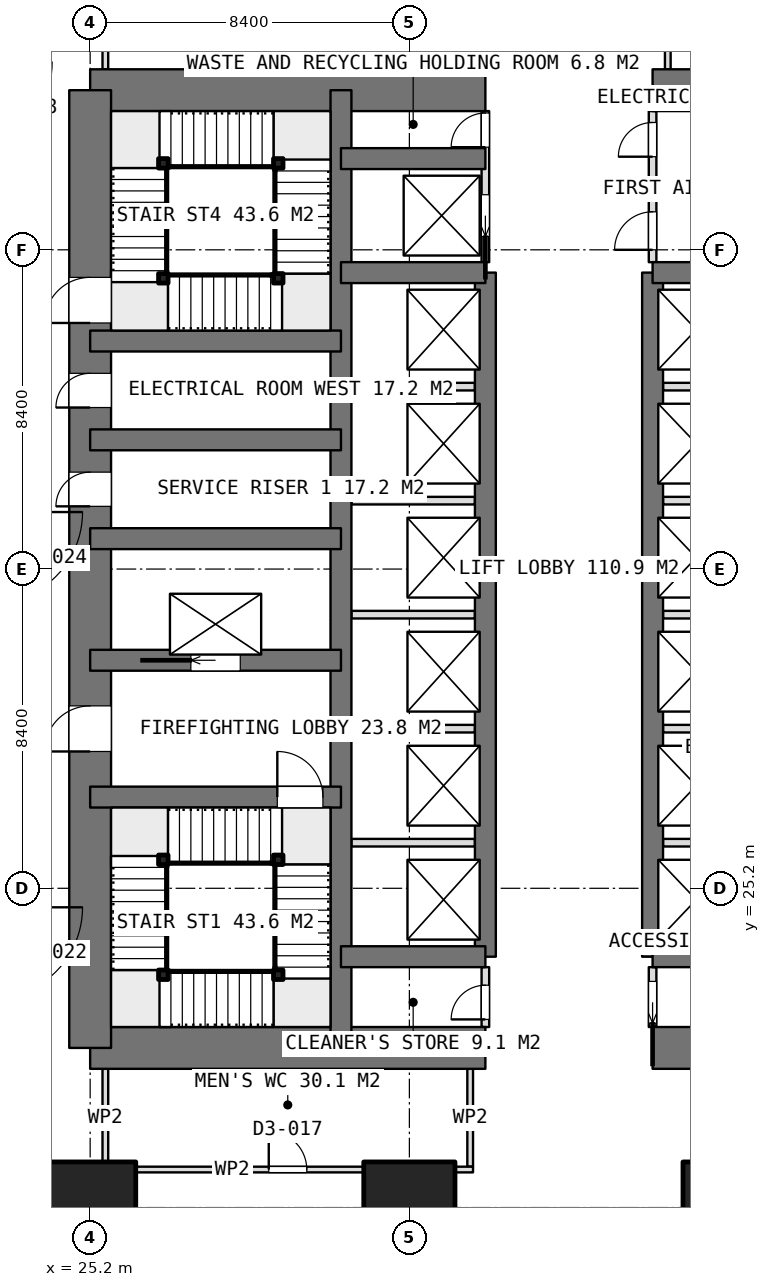
"""IFC4 building model, lengths in metres.
Left out: names, types, materials, properties, quantities, classifications, styles, units other than length and angle.
Written with IfcOpenShell. Run it as: python <this file> out.ifc"""

import sys

from ifc_helpers import new_model, si_unit, direction, frame, frame_2d, origin, origin_2d, place, context, subcontext, project, spatial, rectangle, extrude, element, fill, save


model = new_model("IFC4")
c1 = context("Model", 3, precision=1e-05, world=origin(), true_north=direction((0.0, 1.0)))
c2 = subcontext(c1, "Body", "Model", "MODEL_VIEW")
j1 = project(units=[si_unit("LENGTHUNIT", "METRE"), si_unit("PLANEANGLEUNIT", "RADIAN")], contexts=[c1])
p1 = place(None, origin())
s1 = spatial("IfcSite", under=j1, at=p1, CompositionType="ELEMENT")
p2 = place(p1, origin())
s2 = spatial("IfcBuilding", under=s1, at=p2, CompositionType="ELEMENT")
p3 = place(p2, frame((0.0, 0.0, 10.4)))
s3 = spatial("IfcBuildingStorey", under=s2, at=p3, CompositionType="ELEMENT", Elevation=10.4)
p4 = place(p3, frame((25.2, 21.0, 0.0), z_axis=(0.0, 0.0, 1.0), x_axis=(1.0, 0.0, 0.0)))
e1 = element("IfcWall", 1, at=p4, inside=s3, PredefinedType="SHEAR", context=c2, shape_type="SweptSolid", body=[
    extrude(rectangle(XDim=10.4, YDim=1.1, at=frame_2d((5.2, 0.0))), origin(), (0.0, 0.0, 1.0), 5.0),
])
p5 = place(p3, frame((40.0, 21.0, 0.0), z_axis=(0.0, 0.0, 1.0), x_axis=(1.0, 0.0, 0.0)))
e2 = element("IfcWall", 2, at=p5, inside=s3, PredefinedType="SHEAR", context=c2, shape_type="SweptSolid", body=[
    extrude(rectangle(XDim=10.4, YDim=1.1, at=frame_2d((5.2, 0.0))), origin(), (0.0, 0.0, 1.0), 5.0),
])
p6 = place(p3, frame((25.2, 46.2, 0.0), z_axis=(0.0, 0.0, 1.0), x_axis=(1.0, 0.0, 0.0)))
e3 = element("IfcWall", 3, at=p6, inside=s3, PredefinedType="SHEAR", context=c2, shape_type="SweptSolid", body=[
    extrude(rectangle(XDim=10.4, YDim=1.1, at=frame_2d((5.2, 0.0))), origin(), (0.0, 0.0, 1.0), 5.0),
])
p7 = place(p3, frame((40.0, 46.2, 0.0), z_axis=(0.0, 0.0, 1.0), x_axis=(1.0, 0.0, 0.0)))
e4 = element("IfcWall", 4, at=p7, inside=s3, PredefinedType="SHEAR", context=c2, shape_type="SweptSolid", body=[
    extrude(rectangle(XDim=10.4, YDim=1.1, at=frame_2d((5.2, 0.0))), origin(), (0.0, 0.0, 1.0), 5.0),
])
p8 = place(p3, frame((25.2, 21.0, 0.0), z_axis=(0.0, 0.0, 1.0), x_axis=(0.0, 1.0, 0.0)))
e5 = element("IfcWall", 5, at=p8, inside=s3, PredefinedType="SHEAR", context=c2, shape_type="SweptSolid", body=[
    extrude(rectangle(XDim=25.2, YDim=1.1, at=frame_2d((12.6, 0.0))), origin(), (0.0, 0.0, 1.0), 5.0),
])
p9 = place(p8, frame((7.8, 0.0, 0.0)))
e6 = element("IfcOpeningElement", 6, at=p9, cuts=e5, PredefinedType="OPENING", context=c2, shape_type="SweptSolid", body=[
    extrude(rectangle(XDim=1.2, YDim=2.1, at=frame_2d((0.6, 1.05))), frame((0.0, 0.56, 0.0), z_axis=(0.0, -1.0, 0.0), x_axis=(1.0, 0.0, 0.0)), (0.0, 0.0, 1.0), 1.12),
])
p10 = place(p8, frame((14.25, 0.0, 0.0)))
e7 = element("IfcOpeningElement", 7, at=p10, cuts=e5, PredefinedType="OPENING", context=c2, shape_type="SweptSolid", body=[
    extrude(rectangle(XDim=0.9, YDim=2.1, at=frame_2d((0.45, 1.05))), frame((0.0, 0.56, 0.0), z_axis=(0.0, -1.0, 0.0), x_axis=(1.0, 0.0, 0.0)), (0.0, 0.0, 1.0), 1.12),
])
p11 = place(p8, frame((16.85, 0.0, 0.0)))
e8 = element("IfcOpeningElement", 8, at=p11, cuts=e5, PredefinedType="OPENING", context=c2, shape_type="SweptSolid", body=[
    extrude(rectangle(XDim=0.9, YDim=2.1, at=frame_2d((0.45, 1.05))), frame((0.0, 0.56, 0.0), z_axis=(0.0, -1.0, 0.0), x_axis=(1.0, 0.0, 0.0)), (0.0, 0.0, 1.0), 1.12),
])
p12 = place(p8, frame((19.075, 0.0, 0.0)))
e9 = element("IfcOpeningElement", 9, at=p12, cuts=e5, PredefinedType="OPENING", context=c2, shape_type="SweptSolid", body=[
    extrude(rectangle(XDim=1.2, YDim=2.1, at=frame_2d((0.6, 1.05))), frame((0.0, 0.56, 0.0), z_axis=(0.0, -1.0, 0.0), x_axis=(1.0, 0.0, 0.0)), (0.0, 0.0, 1.0), 1.12),
])
p13 = place(p3, frame((31.8, 21.0, 0.0), z_axis=(0.0, 0.0, 1.0), x_axis=(0.0, 1.0, 0.0)))
e10 = element("IfcWall", 10, at=p13, inside=s3, PredefinedType="SHEAR", context=c2, shape_type="SweptSolid", body=[
    extrude(rectangle(XDim=25.2, YDim=0.55, at=frame_2d((12.6, 0.0))), origin(), (0.0, 0.0, 1.0), 5.0),
])
for number, where, z_axis, x_axis in (
    (11, (35.6, 23.4, 0.0), (0.0, 0.0, 1.0), (0.0, 1.0, 0.0)),
    (12, (40.0, 23.4, 0.0), (0.0, 0.0, 1.0), (0.0, 1.0, 0.0)),
):
    element("IfcWall", number, at=place(p3, frame(where, z_axis=z_axis, x_axis=x_axis)), inside=s3, PredefinedType="SHEAR", context=c2, shape_type="SweptSolid", body=[
        extrude(rectangle(XDim=18.0, YDim=0.55, at=frame_2d((9.0, 0.0))), origin(), (0.0, 0.0, 1.0), 5.0),
    ])
for number, where, z_axis, x_axis in (
    (13, (31.8, 23.4, 0.0), (0.0, 0.0, 1.0), (1.0, 0.0, 0.0)),
    (14, (31.8, 41.4, 0.0), (0.0, 0.0, 1.0), (1.0, 0.0, 0.0)),
    (15, (31.8, 44.4, 0.0), (0.0, 0.0, 1.0), (1.0, 0.0, 0.0)),
    (16, (40.0, 23.4, 0.0), (0.0, 0.0, 1.0), (1.0, 0.0, 0.0)),
    (17, (40.0, 41.4, 0.0), (0.0, 0.0, 1.0), (1.0, 0.0, 0.0)),
):
    element("IfcWall", number, at=place(p3, frame(where, z_axis=z_axis, x_axis=x_axis)), inside=s3, PredefinedType="SHEAR", context=c2, shape_type="SweptSolid", body=[
        extrude(rectangle(XDim=3.8, YDim=0.55, at=frame_2d((1.9, 0.0))), origin(), (0.0, 0.0, 1.0), 5.0),
    ])
p14 = place(p3, frame((25.2, 27.6, 0.0), z_axis=(0.0, 0.0, 1.0), x_axis=(1.0, 0.0, 0.0)))
e18 = element("IfcWall", 18, at=p14, inside=s3, PredefinedType="SHEAR", context=c2, shape_type="SweptSolid", body=[
    extrude(rectangle(XDim=6.6, YDim=0.55, at=frame_2d((3.3, 0.0))), origin(), (0.0, 0.0, 1.0), 5.0),
])
p15 = place(p14, frame((4.925, 0.0, 0.0)))
e19 = element("IfcOpeningElement", 19, at=p15, cuts=e18, PredefinedType="OPENING", context=c2, shape_type="SweptSolid", body=[
    extrude(rectangle(XDim=1.2, YDim=2.1, at=frame_2d((0.6, 1.05))), frame((0.0, 0.285, 0.0), z_axis=(0.0, -1.0, 0.0), x_axis=(1.0, 0.0, 0.0)), (0.0, 0.0, 1.0), 0.57),
])
p16 = place(p3, frame((25.2, 31.2, 0.0), z_axis=(0.0, 0.0, 1.0), x_axis=(1.0, 0.0, 0.0)))
e20 = element("IfcWall", 20, at=p16, inside=s3, PredefinedType="SHEAR", context=c2, shape_type="SweptSolid", body=[
    extrude(rectangle(XDim=6.6, YDim=0.55, at=frame_2d((3.3, 0.0))), origin(), (0.0, 0.0, 1.0), 5.0),
])
p17 = place(p16, frame((2.65, 0.0, 0.0)))
e21 = element("IfcOpeningElement", 21, at=p17, cuts=e20, PredefinedType="OPENING", context=c2, shape_type="SweptSolid", body=[
    extrude(rectangle(XDim=1.3, YDim=2.1, at=frame_2d((0.65, 1.05))), frame((0.0, 0.285, 0.0), z_axis=(0.0, -1.0, 0.0), x_axis=(1.0, 0.0, 0.0)), (0.0, 0.0, 1.0), 0.57),
])
for number, where, z_axis, x_axis in (
    (22, (25.2, 34.4, 0.0), (0.0, 0.0, 1.0), (1.0, 0.0, 0.0)),
    (23, (25.2, 37.0, 0.0), (0.0, 0.0, 1.0), (1.0, 0.0, 0.0)),
    (24, (25.2, 39.6, 0.0), (0.0, 0.0, 1.0), (1.0, 0.0, 0.0)),
):
    element("IfcWall", number, at=place(p3, frame(where, z_axis=z_axis, x_axis=x_axis)), inside=s3, PredefinedType="SHEAR", context=c2, shape_type="SweptSolid", body=[
        extrude(rectangle(XDim=6.6, YDim=0.55, at=frame_2d((3.3, 0.0))), origin(), (0.0, 0.0, 1.0), 5.0),
    ])
for number, where, z_axis, x_axis in (
    (25, (25.2, 16.8, 0.0), (0.0, 0.0, 1.0), (1.0, 0.0, 0.0)),
    (26, (33.6, 16.8, 0.0), (0.0, 0.0, 1.0), (1.0, 0.0, 0.0)),
    (27, (42.0, 16.8, 0.0), (0.0, 0.0, 1.0), (1.0, 0.0, 0.0)),
):
    element("IfcColumn", number, at=place(p3, frame(where, z_axis=z_axis, x_axis=x_axis)), inside=s3, PredefinedType="COLUMN", context=c2, shape_type="SweptSolid", body=[
        extrude(rectangle(XDim=2.4, YDim=2.4, at=origin_2d()), origin(), (0.0, 0.0, 1.0), 5.0),
    ])
for number, where, z_axis, x_axis in (
    (28, (32.075, 26.4, 0.0), (0.0, 0.0, 1.0), (1.0, 0.0, 0.0)),
    (29, (32.075, 29.4, 0.0), (0.0, 0.0, 1.0), (1.0, 0.0, 0.0)),
    (30, (32.075, 32.4, 0.0), (0.0, 0.0, 1.0), (1.0, 0.0, 0.0)),
    (31, (32.075, 35.4, 0.0), (0.0, 0.0, 1.0), (1.0, 0.0, 0.0)),
    (32, (32.075, 38.4, 0.0), (0.0, 0.0, 1.0), (1.0, 0.0, 0.0)),
    (33, (40.275, 26.4, 0.0), (0.0, 0.0, 1.0), (1.0, 0.0, 0.0)),
    (34, (40.275, 29.4, 0.0), (0.0, 0.0, 1.0), (1.0, 0.0, 0.0)),
    (35, (40.275, 32.4, 0.0), (0.0, 0.0, 1.0), (1.0, 0.0, 0.0)),
    (36, (40.275, 35.4, 0.0), (0.0, 0.0, 1.0), (1.0, 0.0, 0.0)),
    (37, (40.275, 38.4, 0.0), (0.0, 0.0, 1.0), (1.0, 0.0, 0.0)),
):
    element("IfcWall", number, at=place(p3, frame(where, z_axis=z_axis, x_axis=x_axis)), inside=s3, PredefinedType="PARTITIONING", context=c2, shape_type="SweptSolid", body=[
        extrude(rectangle(XDim=3.25, YDim=0.2, at=frame_2d((1.625, 0.0))), origin(), (0.0, 0.0, 1.0), 4.7),
    ])
p18 = place(p3, frame((40.0, 21.55, 0.0), z_axis=(0.0, 0.0, 1.0), x_axis=(0.0, 1.0, 0.0)))
e38 = element("IfcWall", 38, at=p18, inside=s3, PredefinedType="PARTITIONING", context=c2, shape_type="SweptSolid", body=[
    extrude(rectangle(XDim=1.575, YDim=0.2, at=frame_2d((0.788, 0.0))), origin(), (0.0, 0.0, 1.0), 4.7),
])
p19 = place(p18, frame((0.1, 0.0, 0.0)))
e39 = element("IfcOpeningElement", 39, at=p19, cuts=e38, PredefinedType="OPENING", context=c2, shape_type="SweptSolid", body=[
    extrude(rectangle(XDim=1.1, YDim=2.1, at=frame_2d((0.55, 1.05))), frame((0.0, 0.11, 0.0), z_axis=(0.0, -1.0, 0.0), x_axis=(1.0, 0.0, 0.0)), (0.0, 0.0, 1.0), 0.22),
])
p20 = place(p3, frame((40.0, 41.675, 0.0), z_axis=(0.0, 0.0, 1.0), x_axis=(0.0, 1.0, 0.0)))
e40 = element("IfcWall", 40, at=p20, inside=s3, PredefinedType="PARTITIONING", context=c2, shape_type="SweptSolid", body=[
    extrude(rectangle(XDim=3.975, YDim=0.2, at=frame_2d((1.987, 0.0))), origin(), (0.0, 0.0, 1.0), 4.7),
])
p21 = place(p20, frame((2.775, 0.0, 0.0)))
e41 = element("IfcOpeningElement", 41, at=p21, cuts=e40, PredefinedType="OPENING", context=c2, shape_type="SweptSolid", body=[
    extrude(rectangle(XDim=0.9, YDim=2.1, at=frame_2d((0.45, 1.05))), frame((0.0, 0.11, 0.0), z_axis=(0.0, -1.0, 0.0), x_axis=(1.0, 0.0, 0.0)), (0.0, 0.0, 1.0), 0.22),
])
p22 = place(p20, frame((0.325, 0.0, 0.0)))
e42 = element("IfcOpeningElement", 42, at=p22, cuts=e40, PredefinedType="OPENING", context=c2, shape_type="SweptSolid", body=[
    extrude(rectangle(XDim=1.0, YDim=2.1, at=frame_2d((0.5, 1.05))), frame((0.0, 0.11, 0.0), z_axis=(0.0, -1.0, 0.0), x_axis=(1.0, 0.0, 0.0)), (0.0, 0.0, 1.0), 0.22),
])
p23 = place(p3, frame((35.6, 41.675, 0.0), z_axis=(0.0, 0.0, 1.0), x_axis=(0.0, 1.0, 0.0)))
e43 = element("IfcWall", 43, at=p23, inside=s3, PredefinedType="PARTITIONING", context=c2, shape_type="SweptSolid", body=[
    extrude(rectangle(XDim=3.975, YDim=0.2, at=frame_2d((1.987, 0.0))), origin(), (0.0, 0.0, 1.0), 4.7),
])
p24 = place(p23, frame((3.025, 0.0, 0.0)))
e44 = element("IfcOpeningElement", 44, at=p24, cuts=e43, PredefinedType="OPENING", context=c2, shape_type="SweptSolid", body=[
    extrude(rectangle(XDim=0.9, YDim=2.1, at=frame_2d((0.45, 1.05))), frame((0.0, 0.11, 0.0), z_axis=(0.0, -1.0, 0.0), x_axis=(1.0, 0.0, 0.0)), (0.0, 0.0, 1.0), 0.22),
])
p25 = place(p23, frame((0.675, 0.0, 0.0)))
e45 = element("IfcOpeningElement", 45, at=p25, cuts=e43, PredefinedType="OPENING", context=c2, shape_type="SweptSolid", body=[
    extrude(rectangle(XDim=1.1, YDim=2.1, at=frame_2d((0.55, 1.05))), frame((0.0, 0.11, 0.0), z_axis=(0.0, -1.0, 0.0), x_axis=(1.0, 0.0, 0.0)), (0.0, 0.0, 1.0), 0.22),
])
p26 = place(p3, frame((35.6, 21.55, 0.0), z_axis=(0.0, 0.0, 1.0), x_axis=(0.0, 1.0, 0.0)))
e46 = element("IfcWall", 46, at=p26, inside=s3, PredefinedType="PARTITIONING", context=c2, shape_type="SweptSolid", body=[
    extrude(rectangle(XDim=1.575, YDim=0.2, at=frame_2d((0.788, 0.0))), origin(), (0.0, 0.0, 1.0), 4.7),
])
p27 = place(p26, frame((0.2, 0.0, 0.0)))
e47 = element("IfcOpeningElement", 47, at=p27, cuts=e46, PredefinedType="OPENING", context=c2, shape_type="SweptSolid", body=[
    extrude(rectangle(XDim=0.9, YDim=2.1, at=frame_2d((0.45, 1.05))), frame((0.0, 0.11, 0.0), z_axis=(0.0, -1.0, 0.0), x_axis=(1.0, 0.0, 0.0)), (0.0, 0.0, 1.0), 0.22),
])
p28 = place(p3, frame((40.0, 43.6, 0.0), z_axis=(0.0, 0.0, 1.0), x_axis=(1.0, 0.0, 0.0)))
e48 = element("IfcWall", 48, at=p28, inside=s3, PredefinedType="PARTITIONING", context=c2, shape_type="SweptSolid", body=[
    extrude(rectangle(XDim=3.525, YDim=0.2, at=frame_2d((1.762, 0.0))), origin(), (0.0, 0.0, 1.0), 4.7),
])
for number, where, z_axis, x_axis in (
    (49, (40.4, 46.75, 0.0), (0.0, 0.0, 1.0), (0.0, 1.0, 0.0)),
    (50, (25.6, 46.75, 0.0), (0.0, 0.0, 1.0), (0.0, 1.0, 0.0)),
    (51, (35.2, 46.75, 0.0), (0.0, 0.0, 1.0), (0.0, 1.0, 0.0)),
):
    element("IfcWall", number, at=place(p3, frame(where, z_axis=z_axis, x_axis=x_axis)), inside=s3, PredefinedType="PARTITIONING", context=c2, shape_type="SweptSolid", body=[
        extrude(rectangle(XDim=2.575, YDim=0.15, at=frame_2d((1.288, 0.0))), origin(), (0.0, 0.0, 1.0), 4.7),
    ])
p29 = place(p3, frame((25.525, 17.8, 0.0), z_axis=(0.0, 0.0, 1.0), x_axis=(1.0, 0.0, 0.0)))
e52 = element("IfcWall", 52, at=p29, inside=s3, PredefinedType="PARTITIONING", context=c2, shape_type="SweptSolid", body=[
    extrude(rectangle(XDim=9.75, YDim=0.15, at=frame_2d((4.875, 0.0))), origin(), (0.0, 0.0, 1.0), 4.7),
])
p30 = place(p29, frame((4.375, 0.0, 0.0)))
e53 = element("IfcOpeningElement", 53, at=p30, cuts=e52, PredefinedType="OPENING", context=c2, shape_type="SweptSolid", body=[
    extrude(rectangle(XDim=1.0, YDim=2.1, at=frame_2d((0.5, 1.05))), frame((0.0, 0.085, 0.0), z_axis=(0.0, -1.0, 0.0), x_axis=(1.0, 0.0, 0.0)), (0.0, 0.0, 1.0), 0.17),
])
for number, where, z_axis, x_axis in (
    (54, (25.6, 17.875, 0.0), (0.0, 0.0, 1.0), (0.0, 1.0, 0.0)),
    (55, (35.2, 17.875, 0.0), (0.0, 0.0, 1.0), (0.0, 1.0, 0.0)),
):
    element("IfcWall", number, at=place(p3, frame(where, z_axis=z_axis, x_axis=x_axis)), inside=s3, PredefinedType="PARTITIONING", context=c2, shape_type="SweptSolid", body=[
        extrude(rectangle(XDim=2.575, YDim=0.15, at=frame_2d((1.288, 0.0))), origin(), (0.0, 0.0, 1.0), 4.7),
    ])
for number, where, z_axis, x_axis in (
    (56, (30.15, 25.95, 0.0), (0.0, 0.0, 1.0), (1.0, 0.0, 0.0)),
    (57, (30.15, 22.925, 0.0), (0.0, 0.0, 1.0), (1.0, 0.0, 0.0)),
    (58, (27.125, 22.925, 0.0), (0.0, 0.0, 1.0), (1.0, 0.0, 0.0)),
    (59, (27.125, 25.95, 0.0), (0.0, 0.0, 1.0), (1.0, 0.0, 0.0)),
    (60, (27.125, 41.25, 0.0), (0.0, 0.0, 1.0), (1.0, 0.0, 0.0)),
    (61, (30.15, 41.25, 0.0), (0.0, 0.0, 1.0), (1.0, 0.0, 0.0)),
    (62, (30.15, 44.275, 0.0), (0.0, 0.0, 1.0), (1.0, 0.0, 0.0)),
    (63, (27.125, 44.275, 0.0), (0.0, 0.0, 1.0), (1.0, 0.0, 0.0)),
):
    element("IfcColumn", number, at=place(p3, frame(where, z_axis=z_axis, x_axis=x_axis)), inside=s3, PredefinedType="COLUMN", context=c2, shape_type="SweptSolid", body=[
        extrude(rectangle(XDim=0.25, YDim=0.25, at=origin_2d()), origin(), (0.0, 0.0, 1.0), 5.0),
    ])
p31 = place(p9, origin())
e64 = element("IfcDoor", 64, at=p31, inside=s3, OperationType="SINGLE_SWING_LEFT", PredefinedType="DOOR", context=c2, shape_type="SweptSolid", body=[
    extrude(rectangle(XDim=1.2, YDim=2.1, at=frame_2d((0.6, 1.05))), frame((0.0, 0.025, 0.0), z_axis=(0.0, -1.0, 0.0), x_axis=(1.0, 0.0, 0.0)), (0.0, 0.0, 1.0), 0.05),
])
fill(e6, e64)
p32 = place(p10, origin())
e65 = element("IfcDoor", 65, at=p32, inside=s3, OperationType="SINGLE_SWING_LEFT", PredefinedType="DOOR", context=c2, shape_type="SweptSolid", body=[
    extrude(rectangle(XDim=0.9, YDim=2.1, at=frame_2d((0.45, 1.05))), frame((0.0, 0.025, 0.0), z_axis=(0.0, -1.0, 0.0), x_axis=(1.0, 0.0, 0.0)), (0.0, 0.0, 1.0), 0.05),
])
fill(e7, e65)
p33 = place(p11, origin())
e66 = element("IfcDoor", 66, at=p33, inside=s3, OperationType="SINGLE_SWING_LEFT", PredefinedType="DOOR", context=c2, shape_type="SweptSolid", body=[
    extrude(rectangle(XDim=0.9, YDim=2.1, at=frame_2d((0.45, 1.05))), frame((0.0, 0.025, 0.0), z_axis=(0.0, -1.0, 0.0), x_axis=(1.0, 0.0, 0.0)), (0.0, 0.0, 1.0), 0.05),
])
fill(e8, e66)
p34 = place(p19, origin())
e67 = element("IfcDoor", 67, at=p34, inside=s3, OperationType="SLIDING_TO_LEFT", PredefinedType="DOOR", context=c2, shape_type="SweptSolid", body=[
    extrude(rectangle(XDim=1.1, YDim=2.1, at=frame_2d((0.55, 1.05))), frame((0.0, 0.025, 0.0), z_axis=(0.0, -1.0, 0.0), x_axis=(1.0, 0.0, 0.0)), (0.0, 0.0, 1.0), 0.05),
])
fill(e39, e67)
p35 = place(p27, origin())
e68 = element("IfcDoor", 68, at=p35, inside=s3, OperationType="SINGLE_SWING_LEFT", PredefinedType="DOOR", context=c2, shape_type="SweptSolid", body=[
    extrude(rectangle(XDim=0.9, YDim=2.1, at=frame_2d((0.45, 1.05))), frame((0.0, 0.025, 0.0), z_axis=(0.0, -1.0, 0.0), x_axis=(1.0, 0.0, 0.0)), (0.0, 0.0, 1.0), 0.05),
])
fill(e47, e68)
p36 = place(p21, origin())
e69 = element("IfcDoor", 69, at=p36, inside=s3, OperationType="SINGLE_SWING_LEFT", PredefinedType="DOOR", context=c2, shape_type="SweptSolid", body=[
    extrude(rectangle(XDim=0.9, YDim=2.1, at=frame_2d((0.45, 1.05))), frame((0.0, 0.025, 0.0), z_axis=(0.0, -1.0, 0.0), x_axis=(1.0, 0.0, 0.0)), (0.0, 0.0, 1.0), 0.05),
])
fill(e41, e69)
p37 = place(p22, origin())
e70 = element("IfcDoor", 70, at=p37, inside=s3, OperationType="SINGLE_SWING_LEFT", PredefinedType="DOOR", context=c2, shape_type="SweptSolid", body=[
    extrude(rectangle(XDim=1.0, YDim=2.1, at=frame_2d((0.5, 1.05))), frame((0.0, 0.025, 0.0), z_axis=(0.0, -1.0, 0.0), x_axis=(1.0, 0.0, 0.0)), (0.0, 0.0, 1.0), 0.05),
])
fill(e42, e70)
p38 = place(p24, origin())
e71 = element("IfcDoor", 71, at=p38, inside=s3, OperationType="SINGLE_SWING_LEFT", PredefinedType="DOOR", context=c2, shape_type="SweptSolid", body=[
    extrude(rectangle(XDim=0.9, YDim=2.1, at=frame_2d((0.45, 1.05))), frame((0.0, 0.025, 0.0), z_axis=(0.0, -1.0, 0.0), x_axis=(1.0, 0.0, 0.0)), (0.0, 0.0, 1.0), 0.05),
])
fill(e44, e71)
p39 = place(p17, origin())
e72 = element("IfcDoor", 72, at=p39, inside=s3, OperationType="SLIDING_TO_LEFT", PredefinedType="USERDEFINED", context=c2, shape_type="SweptSolid", body=[
    extrude(rectangle(XDim=1.3, YDim=2.1, at=frame_2d((0.65, 1.05))), frame((0.0, 0.025, 0.0), z_axis=(0.0, -1.0, 0.0), x_axis=(1.0, 0.0, 0.0)), (0.0, 0.0, 1.0), 0.05),
])
fill(e21, e72)
p40 = place(p25, origin())
e73 = element("IfcDoor", 73, at=p40, inside=s3, OperationType="SLIDING_TO_LEFT", PredefinedType="USERDEFINED", context=c2, shape_type="SweptSolid", body=[
    extrude(rectangle(XDim=1.1, YDim=2.1, at=frame_2d((0.55, 1.05))), frame((0.0, 0.025, 0.0), z_axis=(0.0, -1.0, 0.0), x_axis=(1.0, 0.0, 0.0)), (0.0, 0.0, 1.0), 0.05),
])
fill(e45, e73)
p41 = place(p30, origin())
e74 = element("IfcDoor", 74, at=p41, inside=s3, OperationType="SINGLE_SWING_LEFT", PredefinedType="DOOR", context=c2, shape_type="SweptSolid", body=[
    extrude(rectangle(XDim=1.0, YDim=2.1, at=frame_2d((0.5, 1.05))), frame((0.0, 0.025, 0.0), z_axis=(0.0, -1.0, 0.0), x_axis=(1.0, 0.0, 0.0)), (0.0, 0.0, 1.0), 0.05),
])
fill(e53, e74)
p42 = place(p15, origin())
e75 = element("IfcDoor", 75, at=p42, inside=s3, OperationType="SINGLE_SWING_RIGHT", PredefinedType="DOOR", context=c2, shape_type="SweptSolid", body=[
    extrude(rectangle(XDim=1.2, YDim=2.1, at=frame_2d((0.6, 1.05))), frame((0.0, 0.025, 0.0), z_axis=(0.0, -1.0, 0.0), x_axis=(1.0, 0.0, 0.0)), (0.0, 0.0, 1.0), 0.05),
])
fill(e19, e75)
p43 = place(p12, origin())
e76 = element("IfcDoor", 76, at=p43, inside=s3, OperationType="SINGLE_SWING_RIGHT", PredefinedType="DOOR", context=c2, shape_type="SweptSolid", body=[
    extrude(rectangle(XDim=1.2, YDim=2.1, at=frame_2d((0.6, 1.05))), frame((0.0, 0.025, 0.0), z_axis=(0.0, -1.0, 0.0), x_axis=(1.0, 0.0, 0.0)), (0.0, 0.0, 1.0), 0.05),
])
fill(e9, e76)
save(model, sys.argv[1])
